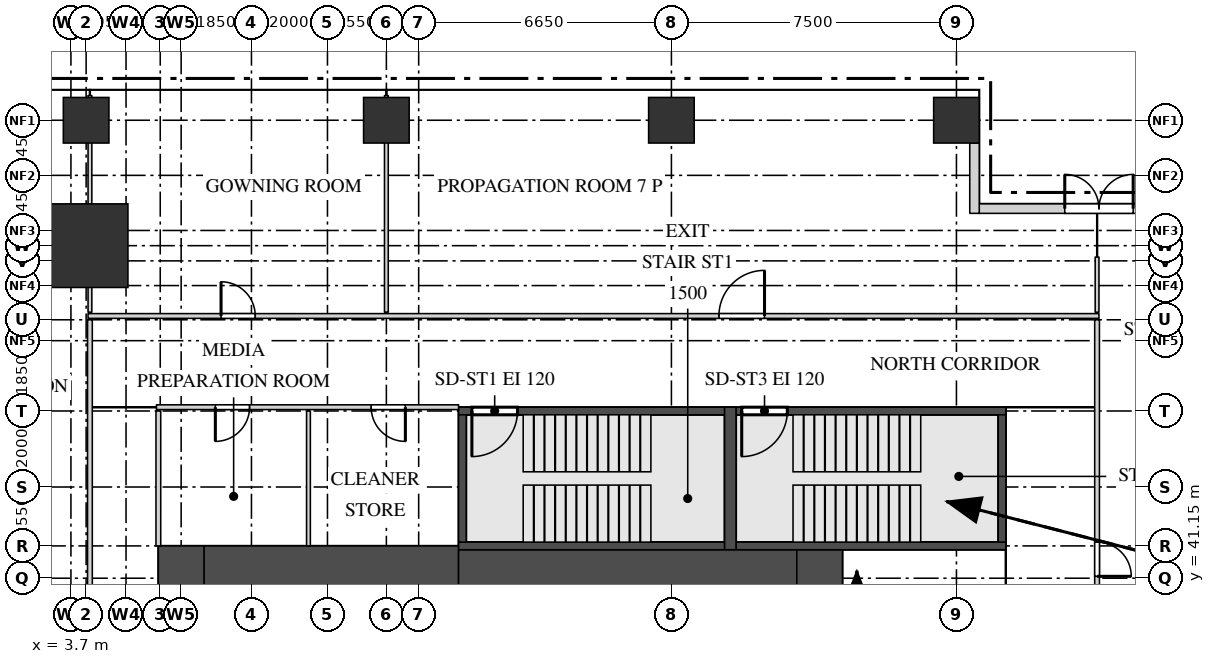
"""IFC4 building model, lengths in metres.
Left out: names, types, materials, properties, quantities, classifications, styles, units other than length and angle.
Written with IfcOpenShell. Run it as: python <this file> out.ifc"""

import sys

from ifc_helpers import new_model, si_unit, direction, frame, frame_2d, origin, origin_2d, place, context, subcontext, project, spatial, rectangle, extrude, source, transform, mapped, element, fill, save


model = new_model("IFC4")
c1 = context("Model", 3, precision=1e-05, world=origin(), true_north=direction((0.0, 1.0)))
c2 = subcontext(c1, "Body", "Model", "MODEL_VIEW")
j1 = project(units=[si_unit("LENGTHUNIT", "METRE"), si_unit("PLANEANGLEUNIT", "RADIAN")], contexts=[c1])
p1 = place(None, origin())
s1 = spatial("IfcSite", under=j1, at=p1, CompositionType="ELEMENT")
p2 = place(p1, origin())
s2 = spatial("IfcBuilding", under=s1, at=p2, CompositionType="ELEMENT")
p3 = place(p2, frame((0.0, 0.0, 46.5)))
s3 = spatial("IfcBuildingStorey", under=s2, at=p3, CompositionType="ELEMENT", Elevation=46.5)
m1 = source(origin(), c2, "Body", "SweptSolid", [
    extrude(rectangle(XDim=6.7, YDim=1.2, at=frame_2d((3.35, 0.0))), origin(), (0.0, 0.0, 1.0), 4.2),
])
p4 = place(p3, frame((7.2, 41.4, 0.0), z_axis=(0.0, 0.0, 1.0), x_axis=(1.0, 0.0, 0.0)))
e1 = element("IfcWall", 1, at=p4, inside=s3, PredefinedType="SHEAR", context=c2, shape_type="MappedRepresentation", body=[
    mapped(m1, transform((0.0, 0.0, 0.0))),
])
m2 = source(origin(), c2, "Body", "SweptSolid", [
    extrude(rectangle(XDim=8.9, YDim=1.1, at=frame_2d((4.45, 0.0))), origin(), (0.0, 0.0, 1.0), 4.2),
])
p5 = place(p3, frame((13.9, 41.35, 0.0), z_axis=(0.0, 0.0, 1.0), x_axis=(1.0, 0.0, 0.0)))
e2 = element("IfcWall", 2, at=p5, inside=s3, PredefinedType="SHEAR", context=c2, shape_type="MappedRepresentation", body=[
    mapped(m2, transform((0.0, 0.0, 0.0))),
])
m3 = source(origin(), c2, "Body", "SweptSolid", [
    extrude(rectangle(XDim=1.2, YDim=1.1, at=frame_2d((0.6, 0.0))), origin(), (0.0, 0.0, 1.0), 4.2),
])
p6 = place(p3, frame((22.8, 41.35, 0.0), z_axis=(0.0, 0.0, 1.0), x_axis=(1.0, 0.0, 0.0)))
e3 = element("IfcWall", 3, at=p6, inside=s3, PredefinedType="SHEAR", context=c2, shape_type="MappedRepresentation", body=[
    mapped(m3, transform((0.0, 0.0, 0.0))),
])
m4 = source(origin(), c2, "Body", "SweptSolid", [
    extrude(rectangle(XDim=1.2, YDim=1.2, at=frame_2d((0.6, 0.0))), origin(), (0.0, 0.0, 1.0), 4.2),
])
p7 = place(p3, frame((6.0, 41.4, 0.0), z_axis=(0.0, 0.0, 1.0), x_axis=(1.0, 0.0, 0.0)))
e4 = element("IfcWall", 4, at=p7, inside=s3, PredefinedType="SHEAR", context=c2, shape_type="MappedRepresentation", body=[
    mapped(m4, transform((0.0, 0.0, 0.0))),
])
m5 = source(origin(), c2, "Body", "SweptSolid", [
    extrude(rectangle(XDim=7.0, YDim=0.2, at=frame_2d((3.5, 0.0))), origin(), (0.0, 0.0, 1.0), 4.2),
])
p8 = place(p3, frame((13.9, 45.55, 0.0), z_axis=(0.0, 0.0, 1.0), x_axis=(1.0, 0.0, 0.0)))
e5 = element("IfcWall", 5, at=p8, inside=s3, PredefinedType="SHEAR", context=c2, shape_type="MappedRepresentation", body=[
    mapped(m5, transform((0.0, 0.0, 0.0))),
])
m6 = source(origin(), c2, "Body", "SweptSolid", [
    extrude(rectangle(XDim=1.2, YDim=2.1, at=frame_2d((0.6, 1.05))), frame((0.0, 0.11, 0.0), z_axis=(0.0, -1.0, 0.0), x_axis=(1.0, 0.0, 0.0)), (0.0, 0.0, 1.0), 0.22),
])
p9 = place(p8, frame((0.35, 0.0, 0.0)))
e6 = element("IfcOpeningElement", 6, at=p9, cuts=e5, PredefinedType="OPENING", context=c2, shape_type="MappedRepresentation", body=[
    mapped(m6, transform((0.0, 0.0, 0.0))),
])
p10 = place(p3, frame((13.9, 42.0, 0.0), z_axis=(0.0, 0.0, 1.0), x_axis=(1.0, 0.0, 0.0)))
e7 = element("IfcWall", 7, at=p10, inside=s3, PredefinedType="SHEAR", context=c2, shape_type="MappedRepresentation", body=[
    mapped(m5, transform((0.0, 0.0, 0.0))),
])
m7 = source(origin(), c2, "Body", "SweptSolid", [
    extrude(rectangle(XDim=7.1, YDim=0.2, at=frame_2d((3.55, 0.0))), origin(), (0.0, 0.0, 1.0), 4.2),
])
p11 = place(p3, frame((21.2, 45.55, 0.0), z_axis=(0.0, 0.0, 1.0), x_axis=(1.0, 0.0, 0.0)))
e8 = element("IfcWall", 8, at=p11, inside=s3, PredefinedType="SHEAR", context=c2, shape_type="MappedRepresentation", body=[
    mapped(m7, transform((0.0, 0.0, 0.0))),
])
p12 = place(p11, frame((0.15, 0.0, 0.0)))
e9 = element("IfcOpeningElement", 9, at=p12, cuts=e8, PredefinedType="OPENING", context=c2, shape_type="MappedRepresentation", body=[
    mapped(m6, transform((0.0, 0.0, 0.0))),
])
p13 = place(p3, frame((21.2, 42.0, 0.0), z_axis=(0.0, 0.0, 1.0), x_axis=(1.0, 0.0, 0.0)))
e10 = element("IfcWall", 10, at=p13, inside=s3, PredefinedType="SHEAR", context=c2, shape_type="MappedRepresentation", body=[
    mapped(m7, transform((0.0, 0.0, 0.0))),
])
m8 = source(origin(), c2, "Body", "SweptSolid", [
    extrude(rectangle(XDim=3.75, YDim=0.3, at=frame_2d((1.875, 0.0))), origin(), (0.0, 0.0, 1.0), 4.2),
])
p14 = place(p3, frame((21.05, 41.9, 0.0), z_axis=(0.0, 0.0, 1.0), x_axis=(0.0, 1.0, 0.0)))
e11 = element("IfcWall", 11, at=p14, inside=s3, PredefinedType="SHEAR", context=c2, shape_type="MappedRepresentation", body=[
    mapped(m8, transform((0.0, 0.0, 0.0))),
])
m9 = source(origin(), c2, "Body", "SweptSolid", [
    extrude(rectangle(XDim=3.35, YDim=0.2, at=frame_2d((1.675, 0.0))), origin(), (0.0, 0.0, 1.0), 4.2),
])
for number, where, z_axis, x_axis in (
    (12, (14.0, 42.1, 0.0), (0.0, 0.0, 1.0), (0.0, 1.0, 0.0)),
    (13, (28.2, 42.1, 0.0), (0.0, 0.0, 1.0), (0.0, 1.0, 0.0)),
):
    element("IfcWall", number, at=place(p3, frame(where, z_axis=z_axis, x_axis=x_axis)), inside=s3, PredefinedType="SHEAR", context=c2, shape_type="MappedRepresentation", body=[
        mapped(m9, transform((0.0, 0.0, 0.0))),
    ])
m10 = source(origin(), c2, "Body", "SweptSolid", [
    extrude(rectangle(XDim=2.2, YDim=2.2, at=origin_2d()), origin(), (0.0, 0.0, 1.0), 4.5),
])
p15 = place(p3, frame((4.1, 49.9, 0.0), z_axis=(0.0, 0.0, 1.0), x_axis=(1.0, 0.0, 0.0)))
e14 = element("IfcColumn", 14, at=p15, inside=s3, PredefinedType="COLUMN", context=c2, shape_type="MappedRepresentation", body=[
    mapped(m10, transform((0.0, 0.0, 0.0))),
])
m11 = source(origin(), c2, "Body", "SweptSolid", [
    extrude(rectangle(XDim=1.2, YDim=1.2, at=origin_2d()), origin(), (0.0, 0.0, 1.0), 4.2),
])
for number, where, z_axis, x_axis in (
    (15, (4.1, 53.2, 0.0), (0.0, 0.0, 1.0), (1.0, 0.0, 0.0)),
    (16, (12.0, 53.2, 0.0), (0.0, 0.0, 1.0), (1.0, 0.0, 0.0)),
    (17, (19.5, 53.2, 0.0), (0.0, 0.0, 1.0), (1.0, 0.0, 0.0)),
    (18, (27.0, 53.2, 0.0), (0.0, 0.0, 1.0), (1.0, 0.0, 0.0)),
):
    element("IfcColumn", number, at=place(p3, frame(where, z_axis=z_axis, x_axis=x_axis)), inside=s3, PredefinedType="COLUMN", context=c2, shape_type="MappedRepresentation", body=[
        mapped(m11, transform((0.0, 0.0, 0.0))),
    ])
m12 = source(origin(), c2, "Body", "SweptSolid", [
    extrude(rectangle(XDim=6.3, YDim=0.25, at=frame_2d((3.15, 0.0))), origin(), (0.0, 0.0, 1.0), 4.2),
])
p16 = place(p3, frame((27.6, 50.875, 0.0), z_axis=(0.0, 0.0, 1.0), x_axis=(1.0, 0.0, 0.0)))
e19 = element("IfcWall", 19, at=p16, inside=s3, PredefinedType="SOLIDWALL", context=c2, shape_type="MappedRepresentation", body=[
    mapped(m12, transform((0.0, 0.0, 0.0))),
])
m13 = source(origin(), c2, "Body", "SweptSolid", [
    extrude(rectangle(XDim=1.6, YDim=2.4, at=frame_2d((0.8, 1.2))), frame((0.0, 0.135, 0.0), z_axis=(0.0, -1.0, 0.0), x_axis=(1.0, 0.0, 0.0)), (0.0, 0.0, 1.0), 0.27),
])
p17 = place(p16, frame((0.35, 0.0, 0.0)))
e20 = element("IfcOpeningElement", 20, at=p17, cuts=e19, PredefinedType="OPENING", context=c2, shape_type="MappedRepresentation", body=[
    mapped(m13, transform((0.0, 0.0, 0.0))),
])
p18 = place(p16, frame((4.35, 0.0, 0.0)))
e21 = element("IfcOpeningElement", 21, at=p18, cuts=e19, PredefinedType="OPENING", context=c2, shape_type="MappedRepresentation", body=[
    mapped(m13, transform((0.0, 0.0, 0.0))),
])
m14 = source(origin(), c2, "Body", "SweptSolid", [
    extrude(rectangle(XDim=1.8, YDim=2.4, at=frame_2d((0.9, 1.2))), frame((0.0, 0.135, 0.0), z_axis=(0.0, -1.0, 0.0), x_axis=(1.0, 0.0, 0.0)), (0.0, 0.0, 1.0), 0.27),
])
p19 = place(p16, frame((2.25, 0.0, 0.0)))
e22 = element("IfcOpeningElement", 22, at=p19, cuts=e19, PredefinedType="OPENING", context=c2, shape_type="MappedRepresentation", body=[
    mapped(m14, transform((0.0, 0.0, 0.0))),
])
m15 = source(origin(), c2, "Body", "SweptSolid", [
    extrude(rectangle(XDim=1.85, YDim=0.25, at=frame_2d((0.925, 0.0))), origin(), (0.0, 0.0, 1.0), 3.9),
])
p20 = place(p3, frame((27.475, 52.6, 0.0), z_axis=(0.0, 0.0, 1.0), x_axis=(0.0, -1.0, 0.0)))
e23 = element("IfcWall", 23, at=p20, inside=s3, PredefinedType="SOLIDWALL", context=c2, shape_type="MappedRepresentation", body=[
    mapped(m15, transform((0.0, 0.0, 0.0))),
])
m16 = source(origin(), c2, "Body", "SweptSolid", [
    extrude(rectangle(XDim=10.15, YDim=0.125, at=frame_2d((5.075, 0.0))), origin(), (0.0, 0.0, 1.0), 4.3),
])
p21 = place(p3, frame((30.7, 37.8, 0.0), z_axis=(0.0, 0.0, 1.0), x_axis=(0.0, 1.0, 0.0)))
e24 = element("IfcWall", 24, at=p21, inside=s3, PredefinedType="PARTITIONING", context=c2, shape_type="MappedRepresentation", body=[
    mapped(m16, transform((0.0, 0.0, 0.0))),
])
m17 = source(origin(), c2, "Body", "SweptSolid", [
    extrude(rectangle(XDim=0.9, YDim=2.1, at=frame_2d((0.45, 1.05))), frame((0.0, 0.073, 0.0), z_axis=(0.0, -1.0, 0.0), x_axis=(1.0, 0.0, 0.0)), (0.0, 0.0, 1.0), 0.145),
])
p22 = place(p21, frame((3.4, 0.0, 0.0)))
e25 = element("IfcOpeningElement", 25, at=p22, cuts=e24, PredefinedType="OPENING", context=c2, shape_type="MappedRepresentation", body=[
    mapped(m17, transform((0.0, 0.0, 0.0))),
])
m18 = source(origin(), c2, "Body", "SweptSolid", [
    extrude(rectangle(XDim=3.55, YDim=0.125, at=frame_2d((1.775, 0.0))), origin(), (0.0, 0.0, 1.0), 4.3),
])
p23 = place(p3, frame((6.0, 42.0, 0.0), z_axis=(0.0, 0.0, 1.0), x_axis=(0.0, 1.0, 0.0)))
e26 = element("IfcWall", 26, at=p23, inside=s3, PredefinedType="PARTITIONING", context=c2, shape_type="MappedRepresentation", body=[
    mapped(m18, transform((0.0, 0.0, 0.0))),
])
m19 = source(origin(), c2, "Body", "SweptSolid", [
    extrude(rectangle(XDim=3.55, YDim=0.1, at=frame_2d((1.775, 0.0))), origin(), (0.0, 0.0, 1.0), 4.3),
])
p24 = place(p3, frame((9.95, 42.0, 0.0), z_axis=(0.0, 0.0, 1.0), x_axis=(0.0, 1.0, 0.0)))
e27 = element("IfcWall", 27, at=p24, inside=s3, PredefinedType="PARTITIONING", context=c2, shape_type="MappedRepresentation", body=[
    mapped(m19, transform((0.0, 0.0, 0.0))),
])
m20 = source(origin(), c2, "Body", "SweptSolid", [
    extrude(rectangle(XDim=7.95, YDim=0.125, at=frame_2d((3.975, 0.0))), origin(), (0.0, 0.0, 1.0), 4.3),
])
p25 = place(p3, frame((5.95, 45.65, 0.0), z_axis=(0.0, 0.0, 1.0), x_axis=(1.0, 0.0, 0.0)))
e28 = element("IfcWall", 28, at=p25, inside=s3, PredefinedType="PARTITIONING", context=c2, shape_type="MappedRepresentation", body=[
    mapped(m20, transform((0.0, 0.0, 0.0))),
])
p26 = place(p25, frame((1.55, 0.0, 0.0)))
e29 = element("IfcOpeningElement", 29, at=p26, cuts=e28, PredefinedType="OPENING", context=c2, shape_type="MappedRepresentation", body=[
    mapped(m17, transform((0.0, 0.0, 0.0))),
])
p27 = place(p25, frame((5.65, 0.0, 0.0)))
e30 = element("IfcOpeningElement", 30, at=p27, cuts=e28, PredefinedType="OPENING", context=c2, shape_type="MappedRepresentation", body=[
    mapped(m17, transform((0.0, 0.0, 0.0))),
])
m21 = source(origin(), c2, "Body", "SweptSolid", [
    extrude(rectangle(XDim=26.6, YDim=0.125, at=frame_2d((13.3, 0.0))), origin(), (0.0, 0.0, 1.0), 4.3),
])
p28 = place(p3, frame((4.15, 48.05, 0.0), z_axis=(0.0, 0.0, 1.0), x_axis=(1.0, 0.0, 0.0)))
e31 = element("IfcWall", 31, at=p28, inside=s3, PredefinedType="PARTITIONING", context=c2, shape_type="MappedRepresentation", body=[
    mapped(m21, transform((0.0, 0.0, 0.0))),
])
p29 = place(p28, frame((3.5, 0.0, 0.0)))
e32 = element("IfcOpeningElement", 32, at=p29, cuts=e31, PredefinedType="OPENING", context=c2, shape_type="MappedRepresentation", body=[
    mapped(m17, transform((0.0, 0.0, 0.0))),
])
m22 = source(origin(), c2, "Body", "SweptSolid", [
    extrude(rectangle(XDim=1.2, YDim=2.1, at=frame_2d((0.6, 1.05))), frame((0.0, 0.073, 0.0), z_axis=(0.0, -1.0, 0.0), x_axis=(1.0, 0.0, 0.0)), (0.0, 0.0, 1.0), 0.145),
])
p30 = place(p28, frame((16.6, 0.0, 0.0)))
e33 = element("IfcOpeningElement", 33, at=p30, cuts=e31, PredefinedType="OPENING", context=c2, shape_type="MappedRepresentation", body=[
    mapped(m22, transform((0.0, 0.0, 0.0))),
])
m23 = source(origin(), c2, "Body", "SweptSolid", [
    extrude(rectangle(XDim=5.7, YDim=0.1, at=frame_2d((2.85, 0.0))), origin(), (0.0, 0.0, 1.0), 3.6),
])
p31 = place(p3, frame((4.2, 48.15, 0.0), z_axis=(0.0, 0.0, 1.0), x_axis=(0.0, 1.0, 0.0)))
e34 = element("IfcWall", 34, at=p31, inside=s3, PredefinedType="PARTITIONING", context=c2, shape_type="MappedRepresentation", body=[
    mapped(m23, transform((0.0, 0.0, 0.0))),
])
m24 = source(origin(), c2, "Body", "SweptSolid", [
    extrude(rectangle(XDim=5.7, YDim=0.1, at=frame_2d((2.85, 0.0))), origin(), (0.0, 0.0, 1.0), 3.7),
])
p32 = place(p3, frame((12.0, 48.15, 0.0), z_axis=(0.0, 0.0, 1.0), x_axis=(0.0, 1.0, 0.0)))
e35 = element("IfcWall", 35, at=p32, inside=s3, PredefinedType="PARTITIONING", context=c2, shape_type="MappedRepresentation", body=[
    mapped(m24, transform((0.0, 0.0, 0.0))),
])
m25 = source(origin(), c2, "Body", "SweptSolid", [
    extrude(rectangle(XDim=1.45, YDim=0.1, at=frame_2d((0.725, 0.0))), origin(), (0.0, 0.0, 1.0), 4.3),
])
p33 = place(p3, frame((30.7, 48.15, 0.0), z_axis=(0.0, 0.0, 1.0), x_axis=(0.0, 1.0, 0.0)))
e36 = element("IfcWall", 36, at=p33, inside=s3, PredefinedType="PARTITIONING", context=c2, shape_type="MappedRepresentation", body=[
    mapped(m25, transform((0.0, 0.0, 0.0))),
])
m26 = source(origin(), c2, "Body", "SweptSolid", [
    extrude(rectangle(XDim=31.2, YDim=0.125, at=frame_2d((15.6, 0.0))), origin(), (0.0, 0.0, 1.0), 4.3),
])
p34 = place(p3, frame((4.2, 16.75, 0.0), z_axis=(0.0, 0.0, 1.0), x_axis=(0.0, 1.0, 0.0)))
e37 = element("IfcWall", 37, at=p34, inside=s3, PredefinedType="PARTITIONING", context=c2, shape_type="MappedRepresentation", body=[
    mapped(m26, transform((0.0, 0.0, 0.0))),
])
p35 = place(p34, frame((5.15, 0.0, 0.0)))
e38 = element("IfcOpeningElement", 38, at=p35, cuts=e37, PredefinedType="OPENING", context=c2, shape_type="MappedRepresentation", body=[
    mapped(m17, transform((0.0, 0.0, 0.0))),
])
p36 = place(p34, frame((20.45, 0.0, 0.0)))
e39 = element("IfcOpeningElement", 39, at=p36, cuts=e37, PredefinedType="OPENING", context=c2, shape_type="MappedRepresentation", body=[
    mapped(m22, transform((0.0, 0.0, 0.0))),
])
m27 = source(origin(), c2, "Body", "SweptSolid", [
    extrude(rectangle(XDim=1.6, YDim=2.4, at=frame_2d((0.8, 1.2))), frame((0.0, 0.03, 0.0), z_axis=(0.0, -1.0, 0.0), x_axis=(1.0, 0.0, 0.0)), (0.0, 0.0, 1.0), 0.06),
])
p37 = place(p17, origin())
e40 = element("IfcWindow", 40, at=p37, inside=s3, PartitioningType="SINGLE_PANEL", PredefinedType="WINDOW", context=c2, shape_type="MappedRepresentation", body=[
    mapped(m27, transform((0.0, 0.0, 0.0))),
])
fill(e20, e40)
m28 = source(origin(), c2, "Body", "SweptSolid", [
    extrude(rectangle(XDim=1.8, YDim=2.4, at=frame_2d((0.9, 1.2))), frame((0.0, 0.025, 0.0), z_axis=(0.0, -1.0, 0.0), x_axis=(1.0, 0.0, 0.0)), (0.0, 0.0, 1.0), 0.05),
])
p38 = place(p19, origin())
e41 = element("IfcDoor", 41, at=p38, inside=s3, OperationType="DOUBLE_DOOR_DOUBLE_SWING", PredefinedType="DOOR", context=c2, shape_type="MappedRepresentation", body=[
    mapped(m28, transform((0.0, 0.0, 0.0))),
])
fill(e22, e41)
m29 = source(origin(), c2, "Body", "SweptSolid", [
    extrude(rectangle(XDim=0.9, YDim=2.1, at=frame_2d((0.45, 1.05))), frame((0.0, 0.025, 0.0), z_axis=(0.0, -1.0, 0.0), x_axis=(1.0, 0.0, 0.0)), (0.0, 0.0, 1.0), 0.05),
])
p39 = place(p22, origin())
e42 = element("IfcDoor", 42, at=p39, inside=s3, OperationType="SINGLE_SWING_LEFT", PredefinedType="DOOR", context=c2, shape_type="MappedRepresentation", body=[
    mapped(m29, transform((0.0, 0.0, 0.0))),
])
fill(e25, e42)
p40 = place(p29, origin())
e43 = element("IfcDoor", 43, at=p40, inside=s3, OperationType="SINGLE_SWING_RIGHT", PredefinedType="DOOR", context=c2, shape_type="MappedRepresentation", body=[
    mapped(m29, transform((0.0, 0.0, 0.0))),
])
fill(e32, e43)
m30 = source(origin(), c2, "Body", "SweptSolid", [
    extrude(rectangle(XDim=1.2, YDim=2.1, at=frame_2d((0.6, 1.05))), frame((0.0, 0.025, 0.0), z_axis=(0.0, -1.0, 0.0), x_axis=(1.0, 0.0, 0.0)), (0.0, 0.0, 1.0), 0.05),
])
p41 = place(p30, origin())
e44 = element("IfcDoor", 44, at=p41, inside=s3, OperationType="SINGLE_SWING_LEFT", PredefinedType="DOOR", context=c2, shape_type="MappedRepresentation", body=[
    mapped(m30, transform((0.0, 0.0, 0.0))),
])
fill(e33, e44)
p42 = place(p26, origin())
e45 = element("IfcDoor", 45, at=p42, inside=s3, OperationType="SINGLE_SWING_LEFT", PredefinedType="DOOR", context=c2, shape_type="MappedRepresentation", body=[
    mapped(m29, transform((0.0, 0.0, 0.0))),
])
fill(e29, e45)
p43 = place(p27, origin())
e46 = element("IfcDoor", 46, at=p43, inside=s3, OperationType="SINGLE_SWING_RIGHT", PredefinedType="DOOR", context=c2, shape_type="MappedRepresentation", body=[
    mapped(m29, transform((0.0, 0.0, 0.0))),
])
fill(e30, e46)
p44 = place(p9, origin())
e47 = element("IfcDoor", 47, at=p44, inside=s3, OperationType="SINGLE_SWING_LEFT", PredefinedType="DOOR", context=c2, shape_type="MappedRepresentation", body=[
    mapped(m30, transform((0.0, 0.0, 0.0))),
])
fill(e6, e47)
p45 = place(p12, origin())
e48 = element("IfcDoor", 48, at=p45, inside=s3, OperationType="SINGLE_SWING_LEFT", PredefinedType="DOOR", context=c2, shape_type="MappedRepresentation", body=[
    mapped(m30, transform((0.0, 0.0, 0.0))),
])
fill(e9, e48)
save(model, sys.argv[1])
